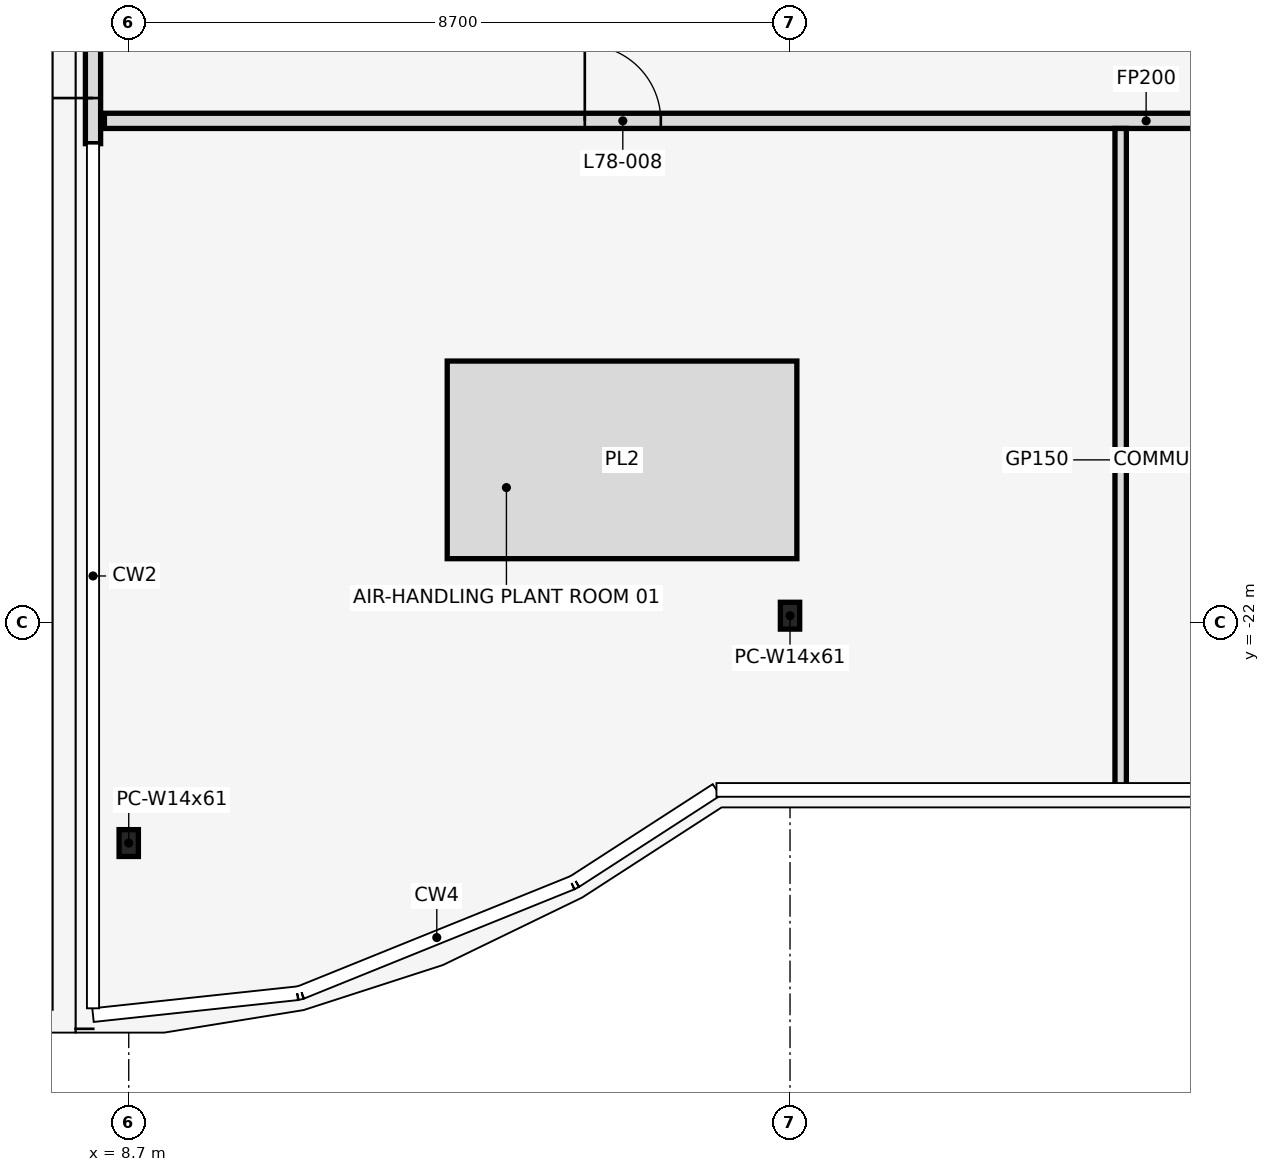
"""IFC4 building model, lengths in metres.
Left out: names, types, materials, properties, quantities, classifications, styles, units other than length and angle.
Written with IfcOpenShell. Run it as: python <this file> out.ifc"""

import sys

from ifc_helpers import new_model, si_unit, direction, frame, frame_2d, origin, origin_2d, place, context, subcontext, project, spatial, rectangle, i_section, extrude, element, fill, save


model = new_model("IFC4")
c1 = context("Model", 3, precision=1e-05, world=origin(), true_north=direction((0.0, 1.0)))
c2 = subcontext(c1, "Body", "Model", "MODEL_VIEW")
j1 = project(units=[si_unit("LENGTHUNIT", "METRE"), si_unit("PLANEANGLEUNIT", "RADIAN")], contexts=[c1])
p1 = place(None, origin())
s1 = spatial("IfcSite", under=j1, at=p1, CompositionType="ELEMENT")
p2 = place(p1, origin())
s2 = spatial("IfcBuilding", under=s1, at=p2, CompositionType="ELEMENT")
p3 = place(p2, frame((0.0, 0.0, 347.9)))
s3 = spatial("IfcBuildingStorey", under=s2, at=p3, CompositionType="ELEMENT", Elevation=347.9)
for number, where, z_axis, x_axis in (
    (1, (8.7, -24.901, 0.0), (0.0, 0.0, 1.0), (1.0, 0.0, 0.0)),
    (2, (17.4, -21.91, 0.0), (0.0, 0.0, 1.0), (1.0, 0.0, 0.0)),
):
    element("IfcColumn", number, at=place(p3, frame(where, z_axis=z_axis, x_axis=x_axis)), inside=s3, PredefinedType="COLUMN", context=c2, shape_type="SweptSolid", body=[
        extrude(i_section(OverallWidth=0.254, OverallDepth=0.353, WebThickness=0.01, FlangeThickness=0.016, at=origin_2d()), origin(), (0.0, 0.0, 1.0), 4.5),
    ])
p4 = place(p3, frame((8.23, -15.7, 0.0), z_axis=(0.0, 0.0, 1.0), x_axis=(0.0, 1.0, 0.0)))
e3 = element("IfcWall", 3, at=p4, inside=s3, PredefinedType="STANDARD", context=c2, shape_type="SweptSolid", body=[
    extrude(rectangle(XDim=3.0, YDim=0.2, at=frame_2d((1.5, 0.0))), origin(), (0.0, 0.0, 1.0), 4.3),
])
p5 = place(p4, frame((0.6, 0.0, 0.0)))
e4 = element("IfcOpeningElement", 4, at=p5, cuts=e3, PredefinedType="OPENING", context=c2, shape_type="SweptSolid", body=[
    extrude(rectangle(XDim=1.8, YDim=2.4, at=frame_2d((0.9, 1.2))), frame((0.0, 0.112, 0.0), z_axis=(0.0, -1.0, 0.0), x_axis=(1.0, 0.0, 0.0)), (0.0, 0.0, 1.0), 0.224),
])
p6 = place(p3, frame((15.19, -19.86, 0.0), z_axis=(0.0, 0.0, 1.0), x_axis=(1.0, 0.0, 0.0)))
e5 = element("IfcWall", 5, at=p6, inside=s3, PredefinedType="USERDEFINED", context=c2, shape_type="SweptSolid", body=[
    extrude(rectangle(XDim=4.6, YDim=2.6, at=origin_2d()), origin(), (0.0, 0.0, 1.0), 0.2),
])
p7 = place(p3, frame((8.38, -15.4, 0.0), z_axis=(0.0, 0.0, 1.0), x_axis=(1.0, 0.0, 0.0)))
e6 = element("IfcWall", 6, at=p7, inside=s3, PredefinedType="PARTITIONING", context=c2, shape_type="SweptSolid", body=[
    extrude(rectangle(XDim=27.41, YDim=0.2, at=frame_2d((13.705, 0.0))), origin(), (0.0, 0.0, 1.0), 3.368),
])
p8 = place(p7, frame((6.32, 0.0, 0.0)))
e7 = element("IfcOpeningElement", 7, at=p8, cuts=e6, PredefinedType="OPENING", context=c2, shape_type="SweptSolid", body=[
    extrude(rectangle(XDim=1.0, YDim=2.1, at=frame_2d((0.5, 1.05))), frame((0.0, 0.112, 0.0), z_axis=(0.0, -1.0, 0.0), x_axis=(1.0, 0.0, 0.0)), (0.0, 0.0, 1.0), 0.224),
])
p9 = place(p7, frame((15.07, 0.0, 0.0)))
e8 = element("IfcOpeningElement", 8, at=p9, cuts=e6, PredefinedType="OPENING", context=c2, shape_type="SweptSolid", body=[
    extrude(rectangle(XDim=0.9, YDim=2.1, at=frame_2d((0.45, 1.05))), frame((0.0, 0.112, 0.0), z_axis=(0.0, -1.0, 0.0), x_axis=(1.0, 0.0, 0.0)), (0.0, 0.0, 1.0), 0.224),
])
p10 = place(p7, frame((20.22, 0.0, 0.0)))
e9 = element("IfcOpeningElement", 9, at=p10, cuts=e6, PredefinedType="OPENING", context=c2, shape_type="SweptSolid", body=[
    extrude(rectangle(XDim=1.0, YDim=2.1, at=frame_2d((0.5, 1.05))), frame((0.0, 0.112, 0.0), z_axis=(0.0, -1.0, 0.0), x_axis=(1.0, 0.0, 0.0)), (0.0, 0.0, 1.0), 0.224),
])
p11 = place(p3, frame((21.75, -24.22, 0.0), z_axis=(0.0, 0.0, 1.0), x_axis=(0.0, 1.0, 0.0)))
e10 = element("IfcWall", 10, at=p11, inside=s3, PredefinedType="PARTITIONING", context=c2, shape_type="SweptSolid", body=[
    extrude(rectangle(XDim=8.72, YDim=0.15, at=frame_2d((4.36, 0.0))), origin(), (0.0, 0.0, 1.0), 3.368),
])
p12 = place(p5, origin())
e11 = element("IfcDoor", 11, at=p12, inside=s3, OperationType="SINGLE_SWING_LEFT", PredefinedType="DOOR", context=c2, shape_type="SweptSolid", body=[
    extrude(rectangle(XDim=1.8, YDim=2.4, at=frame_2d((0.9, 1.2))), frame((0.0, 0.025, 0.0), z_axis=(0.0, -1.0, 0.0), x_axis=(1.0, 0.0, 0.0)), (0.0, 0.0, 1.0), 0.05),
])
fill(e4, e11)
p13 = place(p8, frame((1.0, 0.0, 0.0), z_axis=(0.0, 0.0, 1.0), x_axis=(-1.0, 0.0, 0.0)))
e12 = element("IfcDoor", 12, at=p13, inside=s3, OperationType="SINGLE_SWING_RIGHT", PredefinedType="DOOR", context=c2, shape_type="SweptSolid", body=[
    extrude(rectangle(XDim=1.0, YDim=2.1, at=frame_2d((0.5, 1.05))), frame((0.0, 0.025, 0.0), z_axis=(0.0, -1.0, 0.0), x_axis=(1.0, 0.0, 0.0)), (0.0, 0.0, 1.0), 0.05),
])
fill(e7, e12)
save(model, sys.argv[1])
